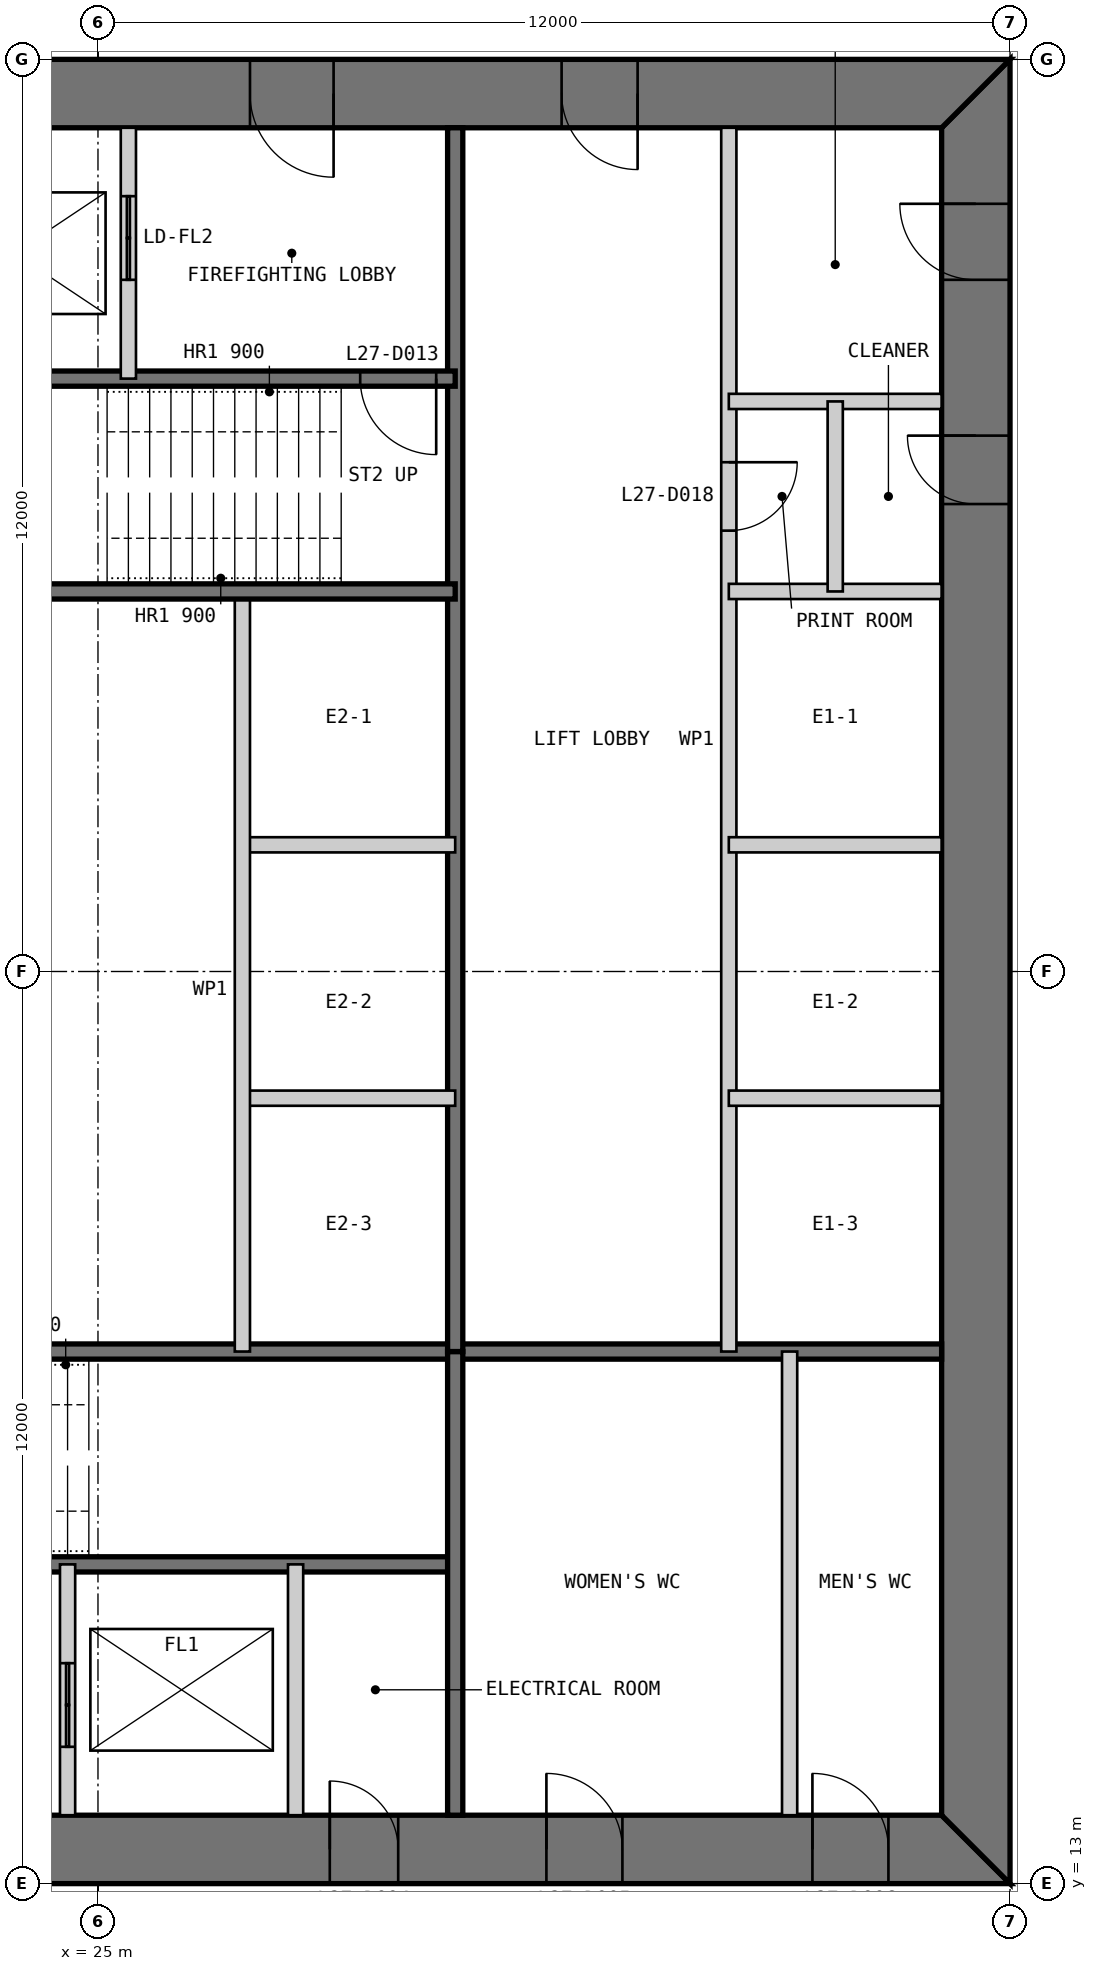
"""IFC4 building model, lengths in metres.
Left out: names, types, materials, properties, quantities, classifications, styles, units other than length and angle.
Written with IfcOpenShell. Run it as: python <this file> out.ifc"""

import sys

from ifc_helpers import new_model, si_unit, direction, frame, frame_2d, origin, place, context, subcontext, project, spatial, polyline, rectangle, outline, extrude, element, fill, save


model = new_model("IFC4")
c1 = context("Model", 3, precision=1e-05, world=origin(), true_north=direction((0.0, 1.0)))
c2 = subcontext(c1, "Body", "Model", "MODEL_VIEW")
j1 = project(units=[si_unit("LENGTHUNIT", "METRE"), si_unit("PLANEANGLEUNIT", "RADIAN")], contexts=[c1])
p1 = place(None, origin())
s1 = spatial("IfcSite", under=j1, at=p1, CompositionType="ELEMENT")
p2 = place(p1, origin())
s2 = spatial("IfcBuilding", under=s1, at=p2, CompositionType="ELEMENT")
p3 = place(p2, frame((0.0, 0.0, 118.4)))
s3 = spatial("IfcBuildingStorey", under=s2, at=p3, CompositionType="ELEMENT", Elevation=118.4)
p4 = place(p3, frame((13.0, 13.45, 0.0), z_axis=(0.0, 0.0, 1.0), x_axis=(1.0, 0.0, 0.0)))
e1 = element("IfcWall", 1, at=p4, inside=s3, PredefinedType="SHEAR", context=c2, shape_type="SweptSolid", body=[
    extrude(outline(polyline([(0.0, -0.45), (24.0, -0.45), (23.1, 0.45), (0.9, 0.45), (0.0, -0.45)])), origin(), (0.0, 0.0, 1.0), 4.0),
])
p5 = place(p4, frame((4.9, 0.0, 0.0)))
e2 = element("IfcOpeningElement", 2, at=p5, cuts=e1, PredefinedType="OPENING", context=c2, shape_type="SweptSolid", body=[
    extrude(rectangle(XDim=1.0, YDim=2.2, at=frame_2d((0.5, 1.1))), frame((0.0, 0.46, 0.0), z_axis=(0.0, -1.0, 0.0), x_axis=(1.0, 0.0, 0.0)), (0.0, 0.0, 1.0), 0.92),
])
p6 = place(p4, frame((8.9, 0.0, 0.0)))
e3 = element("IfcOpeningElement", 3, at=p6, cuts=e1, PredefinedType="OPENING", context=c2, shape_type="SweptSolid", body=[
    extrude(rectangle(XDim=1.1, YDim=2.2, at=frame_2d((0.55, 1.1))), frame((0.0, 0.46, 0.0), z_axis=(0.0, -1.0, 0.0), x_axis=(1.0, 0.0, 0.0)), (0.0, 0.0, 1.0), 0.92),
])
p7 = place(p4, frame((15.05, 0.0, 0.0)))
e4 = element("IfcOpeningElement", 4, at=p7, cuts=e1, PredefinedType="OPENING", context=c2, shape_type="SweptSolid", body=[
    extrude(rectangle(XDim=0.9, YDim=2.2, at=frame_2d((0.45, 1.1))), frame((0.0, 0.46, 0.0), z_axis=(0.0, -1.0, 0.0), x_axis=(1.0, 0.0, 0.0)), (0.0, 0.0, 1.0), 0.92),
])
p8 = place(p4, frame((17.9, 0.0, 0.0)))
e5 = element("IfcOpeningElement", 5, at=p8, cuts=e1, PredefinedType="OPENING", context=c2, shape_type="SweptSolid", body=[
    extrude(rectangle(XDim=1.0, YDim=2.2, at=frame_2d((0.5, 1.1))), frame((0.0, 0.46, 0.0), z_axis=(0.0, -1.0, 0.0), x_axis=(1.0, 0.0, 0.0)), (0.0, 0.0, 1.0), 0.92),
])
p9 = place(p4, frame((21.4, 0.0, 0.0)))
e6 = element("IfcOpeningElement", 6, at=p9, cuts=e1, PredefinedType="OPENING", context=c2, shape_type="SweptSolid", body=[
    extrude(rectangle(XDim=1.0, YDim=2.2, at=frame_2d((0.5, 1.1))), frame((0.0, 0.46, 0.0), z_axis=(0.0, -1.0, 0.0), x_axis=(1.0, 0.0, 0.0)), (0.0, 0.0, 1.0), 0.92),
])
p10 = place(p3, frame((36.55, 13.9, 0.0), z_axis=(0.0, 0.0, 1.0), x_axis=(0.0, 1.0, 0.0)))
e7 = element("IfcWall", 7, at=p10, inside=s3, PredefinedType="SHEAR", context=c2, shape_type="SweptSolid", body=[
    extrude(outline(polyline([(-0.9, -0.45), (23.1, -0.45), (22.2, 0.45), (0.0, 0.45), (-0.9, -0.45)])), origin(), (0.0, 0.0, 1.0), 4.0),
])
p11 = place(p10, frame((20.2, 0.0, 0.0)))
e8 = element("IfcOpeningElement", 8, at=p11, cuts=e7, PredefinedType="OPENING", context=c2, shape_type="SweptSolid", body=[
    extrude(rectangle(XDim=1.0, YDim=2.2, at=frame_2d((0.5, 1.1))), frame((0.0, 0.46, 0.0), z_axis=(0.0, -1.0, 0.0), x_axis=(1.0, 0.0, 0.0)), (0.0, 0.0, 1.0), 0.92),
])
p12 = place(p10, frame((17.25, 0.0, 0.0)))
e9 = element("IfcOpeningElement", 9, at=p12, cuts=e7, PredefinedType="OPENING", context=c2, shape_type="SweptSolid", body=[
    extrude(rectangle(XDim=0.9, YDim=2.2, at=frame_2d((0.45, 1.1))), frame((0.0, 0.46, 0.0), z_axis=(0.0, -1.0, 0.0), x_axis=(1.0, 0.0, 0.0)), (0.0, 0.0, 1.0), 0.92),
])
p13 = place(p3, frame((37.0, 36.55, 0.0), z_axis=(0.0, 0.0, 1.0), x_axis=(-1.0, 0.0, 0.0)))
e10 = element("IfcWall", 10, at=p13, inside=s3, PredefinedType="SHEAR", context=c2, shape_type="SweptSolid", body=[
    extrude(outline(polyline([(0.0, -0.45), (24.0, -0.45), (23.1, 0.45), (0.9, 0.45), (0.0, -0.45)])), origin(), (0.0, 0.0, 1.0), 4.0),
])
p14 = place(p13, frame((4.9, 0.0, 0.0)))
e11 = element("IfcOpeningElement", 11, at=p14, cuts=e10, PredefinedType="OPENING", context=c2, shape_type="SweptSolid", body=[
    extrude(rectangle(XDim=1.0, YDim=2.2, at=frame_2d((0.5, 1.1))), frame((0.0, 0.46, 0.0), z_axis=(0.0, -1.0, 0.0), x_axis=(1.0, 0.0, 0.0)), (0.0, 0.0, 1.0), 0.92),
])
p15 = place(p13, frame((8.9, 0.0, 0.0)))
e12 = element("IfcOpeningElement", 12, at=p15, cuts=e10, PredefinedType="OPENING", context=c2, shape_type="SweptSolid", body=[
    extrude(rectangle(XDim=1.1, YDim=2.2, at=frame_2d((0.55, 1.1))), frame((0.0, 0.46, 0.0), z_axis=(0.0, -1.0, 0.0), x_axis=(1.0, 0.0, 0.0)), (0.0, 0.0, 1.0), 0.92),
])
p16 = place(p13, frame((15.05, 0.0, 0.0)))
e13 = element("IfcOpeningElement", 13, at=p16, cuts=e10, PredefinedType="OPENING", context=c2, shape_type="SweptSolid", body=[
    extrude(rectangle(XDim=0.9, YDim=2.2, at=frame_2d((0.45, 1.1))), frame((0.0, 0.46, 0.0), z_axis=(0.0, -1.0, 0.0), x_axis=(1.0, 0.0, 0.0)), (0.0, 0.0, 1.0), 0.92),
])
p17 = place(p13, frame((17.9, 0.0, 0.0)))
e14 = element("IfcOpeningElement", 14, at=p17, cuts=e10, PredefinedType="OPENING", context=c2, shape_type="SweptSolid", body=[
    extrude(rectangle(XDim=1.0, YDim=2.2, at=frame_2d((0.5, 1.1))), frame((0.0, 0.46, 0.0), z_axis=(0.0, -1.0, 0.0), x_axis=(1.0, 0.0, 0.0)), (0.0, 0.0, 1.0), 0.92),
])
p18 = place(p13, frame((21.4, 0.0, 0.0)))
e15 = element("IfcOpeningElement", 15, at=p18, cuts=e10, PredefinedType="OPENING", context=c2, shape_type="SweptSolid", body=[
    extrude(rectangle(XDim=1.0, YDim=2.2, at=frame_2d((0.5, 1.1))), frame((0.0, 0.46, 0.0), z_axis=(0.0, -1.0, 0.0), x_axis=(1.0, 0.0, 0.0)), (0.0, 0.0, 1.0), 0.92),
])
p19 = place(p3, frame((20.3, 17.2, 0.0), z_axis=(0.0, 0.0, 1.0), x_axis=(1.0, 0.0, 0.0)))
e16 = element("IfcWall", 16, at=p19, inside=s3, PredefinedType="SOLIDWALL", context=c2, shape_type="SweptSolid", body=[
    extrude(rectangle(XDim=9.4, YDim=0.2, at=frame_2d((4.7, 0.0))), origin(), (0.0, 0.0, 1.0), 3.8),
])
p20 = place(p19, frame((0.25, 0.0, 0.0)))
e17 = element("IfcOpeningElement", 17, at=p20, cuts=e16, PredefinedType="OPENING", context=c2, shape_type="SweptSolid", body=[
    extrude(rectangle(XDim=1.0, YDim=2.2, at=frame_2d((0.5, 1.1))), frame((0.0, 0.11, 0.0), z_axis=(0.0, -1.0, 0.0), x_axis=(1.0, 0.0, 0.0)), (0.0, 0.0, 1.0), 0.22),
])
p21 = place(p3, frame((20.3, 20.0, 0.0), z_axis=(0.0, 0.0, 1.0), x_axis=(1.0, 0.0, 0.0)))
e18 = element("IfcWall", 18, at=p21, inside=s3, PredefinedType="SOLIDWALL", context=c2, shape_type="SweptSolid", body=[
    extrude(rectangle(XDim=15.8, YDim=0.2, at=frame_2d((7.9, 0.0))), origin(), (0.0, 0.0, 1.0), 3.8),
])
p22 = place(p3, frame((24.6, 13.9, 0.0), z_axis=(0.0, 0.0, 1.0), x_axis=(0.0, 1.0, 0.0)))
e19 = element("IfcWall", 19, at=p22, inside=s3, PredefinedType="PARTITIONING", context=c2, shape_type="SweptSolid", body=[
    extrude(rectangle(XDim=3.3, YDim=0.2, at=frame_2d((1.65, 0.0))), origin(), (0.0, 0.0, 1.0), 3.8),
])
p23 = place(p22, frame((0.9, 0.0, 0.0)))
e20 = element("IfcOpeningElement", 20, at=p23, cuts=e19, PredefinedType="OPENING", context=c2, shape_type="SweptSolid", body=[
    extrude(rectangle(XDim=1.1, YDim=2.2, at=frame_2d((0.55, 1.1))), frame((0.0, 0.11, 0.0), z_axis=(0.0, -1.0, 0.0), x_axis=(1.0, 0.0, 0.0)), (0.0, 0.0, 1.0), 0.22),
])
p24 = place(p3, frame((27.6, 13.9, 0.0), z_axis=(0.0, 0.0, 1.0), x_axis=(0.0, 1.0, 0.0)))
e21 = element("IfcWall", 21, at=p24, inside=s3, PredefinedType="PARTITIONING", context=c2, shape_type="SweptSolid", body=[
    extrude(rectangle(XDim=3.3, YDim=0.2, at=frame_2d((1.65, 0.0))), origin(), (0.0, 0.0, 1.0), 3.8),
])
p25 = place(p3, frame((29.7, 13.9, 0.0), z_axis=(0.0, 0.0, 1.0), x_axis=(0.0, 1.0, 0.0)))
e22 = element("IfcWall", 22, at=p25, inside=s3, PredefinedType="SOLIDWALL", context=c2, shape_type="SweptSolid", body=[
    extrude(rectangle(XDim=6.1, YDim=0.2, at=frame_2d((3.05, 0.0))), origin(), (0.0, 0.0, 1.0), 3.8),
])
p26 = place(p3, frame((34.1, 13.9, 0.0), z_axis=(0.0, 0.0, 1.0), x_axis=(0.0, 1.0, 0.0)))
e23 = element("IfcWall", 23, at=p26, inside=s3, PredefinedType="PARTITIONING", context=c2, shape_type="SweptSolid", body=[
    extrude(rectangle(XDim=6.1, YDim=0.2, at=frame_2d((3.05, 0.0))), origin(), (0.0, 0.0, 1.0), 3.8),
])
p27 = place(p3, frame((33.3, 36.1, 0.0), z_axis=(0.0, 0.0, 1.0), x_axis=(0.0, -1.0, 0.0)))
e24 = element("IfcWall", 24, at=p27, inside=s3, PredefinedType="PARTITIONING", context=c2, shape_type="SweptSolid", body=[
    extrude(rectangle(XDim=16.1, YDim=0.2, at=frame_2d((8.05, 0.0))), origin(), (0.0, 0.0, 1.0), 3.8),
])
p28 = place(p27, frame((4.4, 0.0, 0.0)))
e25 = element("IfcOpeningElement", 25, at=p28, cuts=e24, PredefinedType="OPENING", context=c2, shape_type="SweptSolid", body=[
    extrude(rectangle(XDim=0.9, YDim=2.2, at=frame_2d((0.45, 1.1))), frame((0.0, 0.11, 0.0), z_axis=(0.0, -1.0, 0.0), x_axis=(1.0, 0.0, 0.0)), (0.0, 0.0, 1.0), 0.22),
])
p29 = place(p3, frame((29.7, 36.1, 0.0), z_axis=(0.0, 0.0, 1.0), x_axis=(0.0, -1.0, 0.0)))
e26 = element("IfcWall", 26, at=p29, inside=s3, PredefinedType="SOLIDWALL", context=c2, shape_type="SweptSolid", body=[
    extrude(rectangle(XDim=16.1, YDim=0.2, at=frame_2d((8.05, 0.0))), origin(), (0.0, 0.0, 1.0), 3.8),
])
for number, where, z_axis, x_axis in (
    (27, (36.1, 30.0, 0.0), (0.0, 0.0, 1.0), (-1.0, 0.0, 0.0)),
    (28, (36.1, 26.667, 0.0), (0.0, 0.0, 1.0), (-1.0, 0.0, 0.0)),
    (29, (36.1, 23.333, 0.0), (0.0, 0.0, 1.0), (-1.0, 0.0, 0.0)),
    (30, (29.7, 26.667, 0.0), (0.0, 0.0, 1.0), (-1.0, 0.0, 0.0)),
    (31, (29.7, 23.333, 0.0), (0.0, 0.0, 1.0), (-1.0, 0.0, 0.0)),
):
    element("IfcWall", number, at=place(p3, frame(where, z_axis=z_axis, x_axis=x_axis)), inside=s3, PredefinedType="PARTITIONING", context=c2, shape_type="SweptSolid", body=[
        extrude(rectangle(XDim=2.8, YDim=0.2, at=frame_2d((1.4, 0.0))), origin(), (0.0, 0.0, 1.0), 3.8),
    ])
p30 = place(p3, frame((26.9, 30.0, 0.0), z_axis=(0.0, 0.0, 1.0), x_axis=(0.0, -1.0, 0.0)))
e32 = element("IfcWall", 32, at=p30, inside=s3, PredefinedType="PARTITIONING", context=c2, shape_type="SweptSolid", body=[
    extrude(rectangle(XDim=10.0, YDim=0.2, at=frame_2d((5.0, 0.0))), origin(), (0.0, 0.0, 1.0), 3.8),
])
p31 = place(p3, frame((29.7, 32.8, 0.0), z_axis=(0.0, 0.0, 1.0), x_axis=(-1.0, 0.0, 0.0)))
e33 = element("IfcWall", 33, at=p31, inside=s3, PredefinedType="SOLIDWALL", context=c2, shape_type="SweptSolid", body=[
    extrude(rectangle(XDim=9.4, YDim=0.2, at=frame_2d((4.7, 0.0))), origin(), (0.0, 0.0, 1.0), 3.8),
])
p32 = place(p31, frame((0.25, 0.0, 0.0)))
e34 = element("IfcOpeningElement", 34, at=p32, cuts=e33, PredefinedType="OPENING", context=c2, shape_type="SweptSolid", body=[
    extrude(rectangle(XDim=1.0, YDim=2.2, at=frame_2d((0.5, 1.1))), frame((0.0, 0.11, 0.0), z_axis=(0.0, -1.0, 0.0), x_axis=(1.0, 0.0, 0.0)), (0.0, 0.0, 1.0), 0.22),
])
p33 = place(p3, frame((29.7, 30.0, 0.0), z_axis=(0.0, 0.0, 1.0), x_axis=(-1.0, 0.0, 0.0)))
e35 = element("IfcWall", 35, at=p33, inside=s3, PredefinedType="SOLIDWALL", context=c2, shape_type="SweptSolid", body=[
    extrude(rectangle(XDim=15.8, YDim=0.2, at=frame_2d((7.9, 0.0))), origin(), (0.0, 0.0, 1.0), 3.8),
])
p34 = place(p3, frame((25.4, 36.1, 0.0), z_axis=(0.0, 0.0, 1.0), x_axis=(0.0, -1.0, 0.0)))
e36 = element("IfcWall", 36, at=p34, inside=s3, PredefinedType="PARTITIONING", context=c2, shape_type="SweptSolid", body=[
    extrude(rectangle(XDim=3.3, YDim=0.2, at=frame_2d((1.65, 0.0))), origin(), (0.0, 0.0, 1.0), 3.8),
])
p35 = place(p34, frame((0.9, 0.0, 0.0)))
e37 = element("IfcOpeningElement", 37, at=p35, cuts=e36, PredefinedType="OPENING", context=c2, shape_type="SweptSolid", body=[
    extrude(rectangle(XDim=1.1, YDim=2.2, at=frame_2d((0.55, 1.1))), frame((0.0, 0.11, 0.0), z_axis=(0.0, -1.0, 0.0), x_axis=(1.0, 0.0, 0.0)), (0.0, 0.0, 1.0), 0.22),
])
p36 = place(p3, frame((36.1, 32.5, 0.0), z_axis=(0.0, 0.0, 1.0), x_axis=(-1.0, 0.0, 0.0)))
e38 = element("IfcWall", 38, at=p36, inside=s3, PredefinedType="PARTITIONING", context=c2, shape_type="SweptSolid", body=[
    extrude(rectangle(XDim=2.8, YDim=0.2, at=frame_2d((1.4, 0.0))), origin(), (0.0, 0.0, 1.0), 3.8),
])
p37 = place(p3, frame((34.7, 32.5, 0.0), z_axis=(0.0, 0.0, 1.0), x_axis=(0.0, -1.0, 0.0)))
e39 = element("IfcWall", 39, at=p37, inside=s3, PredefinedType="PARTITIONING", context=c2, shape_type="SweptSolid", body=[
    extrude(rectangle(XDim=2.5, YDim=0.2, at=frame_2d((1.25, 0.0))), origin(), (0.0, 0.0, 1.0), 3.8),
])
p38 = place(p7, origin())
e40 = element("IfcDoor", 40, at=p38, inside=s3, OperationType="SINGLE_SWING_LEFT", PredefinedType="DOOR", context=c2, shape_type="SweptSolid", body=[
    extrude(rectangle(XDim=0.9, YDim=2.2, at=frame_2d((0.45, 1.1))), frame((0.0, 0.025, 0.0), z_axis=(0.0, -1.0, 0.0), x_axis=(1.0, 0.0, 0.0)), (0.0, 0.0, 1.0), 0.05),
    extrude(outline(polyline([(0.0, 0.0), (0.04, 0.0), (0.04, 2.16), (0.86, 2.16), (0.86, 0.0), (0.9, 0.0), (0.9, 2.2), (0.0, 2.2), (0.0, 0.0)])), frame((0.0, 0.3, 0.0), z_axis=(0.0, -1.0, 0.0), x_axis=(1.0, 0.0, 0.0)), (0.0, 0.0, 1.0), 0.6),
])
fill(e4, e40)
p39 = place(p8, origin())
e41 = element("IfcDoor", 41, at=p39, inside=s3, OperationType="SINGLE_SWING_LEFT", PredefinedType="DOOR", context=c2, shape_type="SweptSolid", body=[
    extrude(rectangle(XDim=1.0, YDim=2.2, at=frame_2d((0.5, 1.1))), frame((0.0, 0.025, 0.0), z_axis=(0.0, -1.0, 0.0), x_axis=(1.0, 0.0, 0.0)), (0.0, 0.0, 1.0), 0.05),
    extrude(outline(polyline([(0.0, 0.0), (0.04, 0.0), (0.04, 2.16), (0.96, 2.16), (0.96, 0.0), (1.0, 0.0), (1.0, 2.2), (0.0, 2.2), (0.0, 0.0)])), frame((0.0, 0.3, 0.0), z_axis=(0.0, -1.0, 0.0), x_axis=(1.0, 0.0, 0.0)), (0.0, 0.0, 1.0), 0.6),
])
fill(e5, e41)
p40 = place(p9, origin())
e42 = element("IfcDoor", 42, at=p40, inside=s3, OperationType="SINGLE_SWING_LEFT", PredefinedType="DOOR", context=c2, shape_type="SweptSolid", body=[
    extrude(rectangle(XDim=1.0, YDim=2.2, at=frame_2d((0.5, 1.1))), frame((0.0, 0.025, 0.0), z_axis=(0.0, -1.0, 0.0), x_axis=(1.0, 0.0, 0.0)), (0.0, 0.0, 1.0), 0.05),
    extrude(outline(polyline([(0.0, 0.0), (0.04, 0.0), (0.04, 2.16), (0.96, 2.16), (0.96, 0.0), (1.0, 0.0), (1.0, 2.2), (0.0, 2.2), (0.0, 0.0)])), frame((0.0, 0.3, 0.0), z_axis=(0.0, -1.0, 0.0), x_axis=(1.0, 0.0, 0.0)), (0.0, 0.0, 1.0), 0.6),
])
fill(e6, e42)
p41 = place(p14, origin())
e43 = element("IfcDoor", 43, at=p41, inside=s3, OperationType="SINGLE_SWING_LEFT", PredefinedType="DOOR", context=c2, shape_type="SweptSolid", body=[
    extrude(rectangle(XDim=1.0, YDim=2.2, at=frame_2d((0.5, 1.1))), frame((0.0, 0.025, 0.0), z_axis=(0.0, -1.0, 0.0), x_axis=(1.0, 0.0, 0.0)), (0.0, 0.0, 1.0), 0.05),
    extrude(outline(polyline([(0.0, 0.0), (0.04, 0.0), (0.04, 2.16), (0.96, 2.16), (0.96, 0.0), (1.0, 0.0), (1.0, 2.2), (0.0, 2.2), (0.0, 0.0)])), frame((0.0, 0.3, 0.0), z_axis=(0.0, -1.0, 0.0), x_axis=(1.0, 0.0, 0.0)), (0.0, 0.0, 1.0), 0.6),
])
fill(e11, e43)
p42 = place(p15, origin())
e44 = element("IfcDoor", 44, at=p42, inside=s3, OperationType="SINGLE_SWING_LEFT", PredefinedType="DOOR", context=c2, shape_type="SweptSolid", body=[
    extrude(rectangle(XDim=1.1, YDim=2.2, at=frame_2d((0.55, 1.1))), frame((0.0, 0.025, 0.0), z_axis=(0.0, -1.0, 0.0), x_axis=(1.0, 0.0, 0.0)), (0.0, 0.0, 1.0), 0.05),
    extrude(outline(polyline([(0.0, 0.0), (0.04, 0.0), (0.04, 2.16), (1.06, 2.16), (1.06, 0.0), (1.1, 0.0), (1.1, 2.2), (0.0, 2.2), (0.0, 0.0)])), frame((0.0, 0.3, 0.0), z_axis=(0.0, -1.0, 0.0), x_axis=(1.0, 0.0, 0.0)), (0.0, 0.0, 1.0), 0.6),
])
fill(e12, e44)
p43 = place(p32, origin())
e45 = element("IfcDoor", 45, at=p43, inside=s3, OperationType="SINGLE_SWING_LEFT", PredefinedType="DOOR", context=c2, shape_type="SweptSolid", body=[
    extrude(rectangle(XDim=1.0, YDim=2.2, at=frame_2d((0.5, 1.1))), frame((0.0, 0.025, 0.0), z_axis=(0.0, -1.0, 0.0), x_axis=(1.0, 0.0, 0.0)), (0.0, 0.0, 1.0), 0.05),
])
fill(e34, e45)
p44 = place(p11, origin())
e46 = element("IfcDoor", 46, at=p44, inside=s3, OperationType="SINGLE_SWING_RIGHT", PredefinedType="DOOR", context=c2, shape_type="SweptSolid", body=[
    extrude(rectangle(XDim=1.0, YDim=2.2, at=frame_2d((0.5, 1.1))), frame((0.0, 0.025, 0.0), z_axis=(0.0, -1.0, 0.0), x_axis=(1.0, 0.0, 0.0)), (0.0, 0.0, 1.0), 0.05),
    extrude(outline(polyline([(0.0, 0.0), (0.04, 0.0), (0.04, 2.16), (0.96, 2.16), (0.96, 0.0), (1.0, 0.0), (1.0, 2.2), (0.0, 2.2), (0.0, 0.0)])), frame((0.0, 0.3, 0.0), z_axis=(0.0, -1.0, 0.0), x_axis=(1.0, 0.0, 0.0)), (0.0, 0.0, 1.0), 0.6),
])
fill(e8, e46)
p45 = place(p28, origin())
e47 = element("IfcDoor", 47, at=p45, inside=s3, OperationType="SINGLE_SWING_LEFT", PredefinedType="DOOR", context=c2, shape_type="SweptSolid", body=[
    extrude(rectangle(XDim=0.9, YDim=2.2, at=frame_2d((0.45, 1.1))), frame((0.0, 0.025, 0.0), z_axis=(0.0, -1.0, 0.0), x_axis=(1.0, 0.0, 0.0)), (0.0, 0.0, 1.0), 0.05),
])
fill(e25, e47)
p46 = place(p12, origin())
e48 = element("IfcDoor", 48, at=p46, inside=s3, OperationType="SINGLE_SWING_RIGHT", PredefinedType="DOOR", context=c2, shape_type="SweptSolid", body=[
    extrude(rectangle(XDim=0.9, YDim=2.2, at=frame_2d((0.45, 1.1))), frame((0.0, 0.025, 0.0), z_axis=(0.0, -1.0, 0.0), x_axis=(1.0, 0.0, 0.0)), (0.0, 0.0, 1.0), 0.05),
    extrude(outline(polyline([(0.0, 0.0), (0.04, 0.0), (0.04, 2.16), (0.86, 2.16), (0.86, 0.0), (0.9, 0.0), (0.9, 2.2), (0.0, 2.2), (0.0, 0.0)])), frame((0.0, 0.3, 0.0), z_axis=(0.0, -1.0, 0.0), x_axis=(1.0, 0.0, 0.0)), (0.0, 0.0, 1.0), 0.6),
])
fill(e9, e48)
p47 = place(p23, origin())
e49 = element("IfcDoor", 49, at=p47, inside=s3, OperationType="DOUBLE_DOOR_SLIDING", PredefinedType="DOOR", context=c2, shape_type="SweptSolid", body=[
    extrude(rectangle(XDim=1.1, YDim=2.2, at=frame_2d((0.55, 1.1))), frame((0.0, 0.025, 0.0), z_axis=(0.0, -1.0, 0.0), x_axis=(1.0, 0.0, 0.0)), (0.0, 0.0, 1.0), 0.05),
])
fill(e20, e49)
p48 = place(p35, origin())
e50 = element("IfcDoor", 50, at=p48, inside=s3, OperationType="DOUBLE_DOOR_SLIDING", PredefinedType="DOOR", context=c2, shape_type="SweptSolid", body=[
    extrude(rectangle(XDim=1.1, YDim=2.2, at=frame_2d((0.55, 1.1))), frame((0.0, 0.025, 0.0), z_axis=(0.0, -1.0, 0.0), x_axis=(1.0, 0.0, 0.0)), (0.0, 0.0, 1.0), 0.05),
])
fill(e37, e50)
save(model, sys.argv[1])
